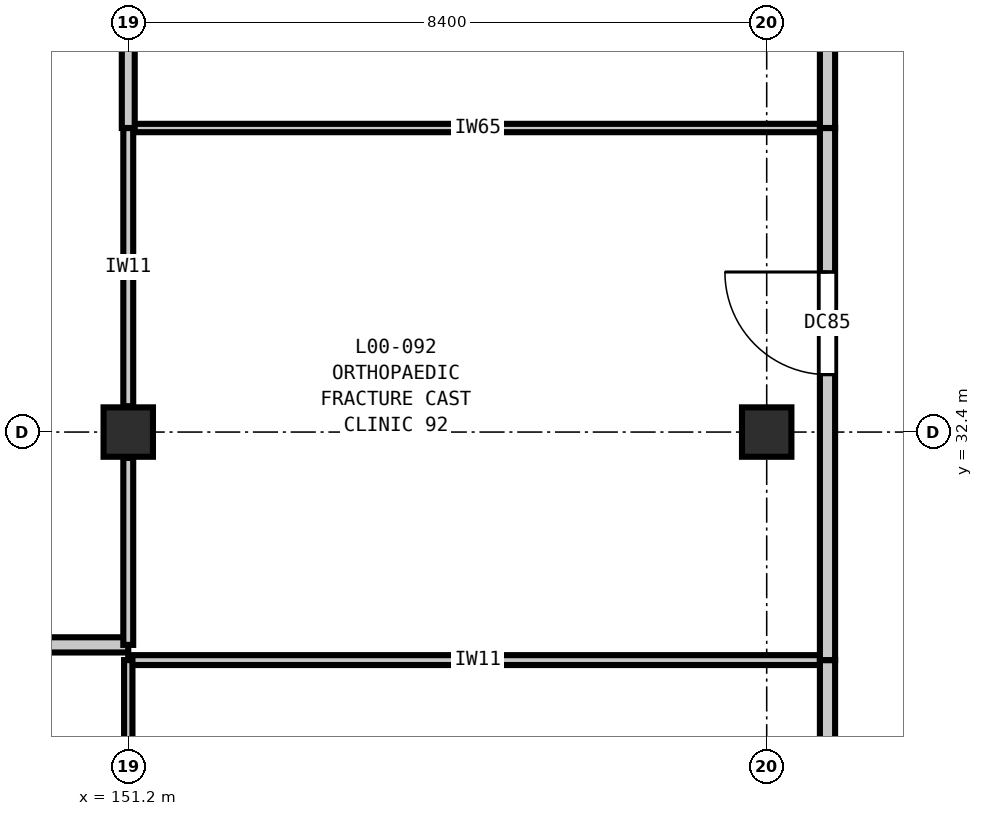
"""IFC4 building model, lengths in metres.
Left out: names, types, materials, properties, quantities, classifications, styles, units other than length and angle.
Written with IfcOpenShell. Run it as: python <this file> out.ifc"""

import sys

from ifc_helpers import new_model, si_unit, direction, frame, frame_2d, origin, origin_2d, place, context, subcontext, project, spatial, rectangle, extrude, element, fill, save


model = new_model("IFC4")
c1 = context("Model", 3, precision=1e-05, world=origin(), true_north=direction((0.0, 1.0)))
c2 = subcontext(c1, "Body", "Model", "MODEL_VIEW")
j1 = project(units=[si_unit("LENGTHUNIT", "METRE"), si_unit("PLANEANGLEUNIT", "RADIAN")], contexts=[c1])
p1 = place(None, origin())
s1 = spatial("IfcSite", under=j1, at=p1, CompositionType="ELEMENT")
p2 = place(p1, origin())
s2 = spatial("IfcBuilding", under=s1, at=p2, CompositionType="ELEMENT")
p3 = place(p2, origin())
s3 = spatial("IfcBuildingStorey", under=s2, at=p3, CompositionType="ELEMENT", Elevation=0.0)
for number, where, z_axis, x_axis in (
    (1, (151.2, 32.4, 0.0), (0.0, 0.0, 1.0), (1.0, 0.0, 0.0)),
    (2, (159.6, 32.4, 0.0), (0.0, 0.0, 1.0), (1.0, 0.0, 0.0)),
):
    element("IfcColumn", number, at=place(p3, frame(where, z_axis=z_axis, x_axis=x_axis)), inside=s3, PredefinedType="COLUMN", context=c2, shape_type="SweptSolid", body=[
        extrude(rectangle(XDim=0.65, YDim=0.65, at=origin_2d()), origin(), (0.0, 0.0, 1.0), 5.4),
    ])
p4 = place(p3, frame((151.2, 29.4, 0.0), z_axis=(0.0, 0.0, 1.0), x_axis=(1.0, 0.0, 0.0)))
e3 = element("IfcWall", 3, at=p4, inside=s3, PredefinedType="PARTITIONING", context=c2, shape_type="SweptSolid", body=[
    extrude(rectangle(XDim=9.2, YDim=0.13, at=frame_2d((4.6, 0.0))), origin(), (0.0, 0.0, 1.0), 5.04),
])
p5 = place(p3, frame((141.4, 29.6, 0.0), z_axis=(0.0, 0.0, 1.0), x_axis=(1.0, 0.0, 0.0)))
e4 = element("IfcWall", 4, at=p5, inside=s3, PredefinedType="PARTITIONING", context=c2, shape_type="SweptSolid", body=[
    extrude(rectangle(XDim=9.8, YDim=0.2, at=frame_2d((4.9, 0.0))), origin(), (0.0, 0.0, 1.0), 5.04),
])
p6 = place(p5, frame((4.125, 0.0, 0.0)))
e5 = element("IfcOpeningElement", 5, at=p6, cuts=e4, PredefinedType="OPENING", context=c2, shape_type="SweptSolid", body=[
    extrude(rectangle(XDim=1.55, YDim=2.25, at=frame_2d((0.775, 1.125))), frame((0.0, 0.11, 0.0), z_axis=(0.0, -1.0, 0.0), x_axis=(1.0, 0.0, 0.0)), (0.0, 0.0, 1.0), 0.22),
])
p7 = place(p3, frame((151.2, 36.4, 0.0), z_axis=(0.0, 0.0, 1.0), x_axis=(1.0, 0.0, 0.0)))
e6 = element("IfcWall", 6, at=p7, inside=s3, PredefinedType="PARTITIONING", context=c2, shape_type="SweptSolid", body=[
    extrude(rectangle(XDim=9.2, YDim=0.11, at=frame_2d((4.6, 0.0))), origin(), (0.0, 0.0, 1.0), 5.04),
])
p8 = place(p3, frame((151.2, 26.8, 0.0), z_axis=(0.0, 0.0, 1.0), x_axis=(0.0, 1.0, 0.0)))
e7 = element("IfcWall", 7, at=p8, inside=s3, PredefinedType="PARTITIONING", context=c2, shape_type="SweptSolid", body=[
    extrude(rectangle(XDim=2.6, YDim=0.11, at=frame_2d((1.3, 0.0))), origin(), (0.0, 0.0, 1.0), 4.685),
])
p9 = place(p3, frame((151.2, 32.74, 0.0), z_axis=(0.0, 0.0, 1.0), x_axis=(0.0, 1.0, 0.0)))
e8 = element("IfcWall", 8, at=p9, inside=s3, PredefinedType="PARTITIONING", context=c2, shape_type="SweptSolid", body=[
    extrude(rectangle(XDim=3.66, YDim=0.13, at=frame_2d((1.83, 0.0))), origin(), (0.0, 0.0, 1.0), 4.685),
])
p10 = place(p3, frame((151.2, 29.6, 0.0), z_axis=(0.0, 0.0, 1.0), x_axis=(0.0, 1.0, 0.0)))
e9 = element("IfcWall", 9, at=p10, inside=s3, PredefinedType="PARTITIONING", context=c2, shape_type="SweptSolid", body=[
    extrude(rectangle(XDim=2.46, YDim=0.13, at=frame_2d((1.23, 0.0))), origin(), (0.0, 0.0, 1.0), 4.685),
])
p11 = place(p3, frame((151.2, 36.4, 0.0), z_axis=(0.0, 0.0, 1.0), x_axis=(0.0, 1.0, 0.0)))
e10 = element("IfcWall", 10, at=p11, inside=s3, PredefinedType="PARTITIONING", context=c2, shape_type="SweptSolid", body=[
    extrude(rectangle(XDim=4.06, YDim=0.17, at=frame_2d((2.03, 0.0))), origin(), (0.0, 0.0, 1.0), 4.685),
])
p12 = place(p3, frame((160.4, 23.8, 0.0), z_axis=(0.0, 0.0, 1.0), x_axis=(0.0, 1.0, 0.0)))
e11 = element("IfcWall", 11, at=p12, inside=s3, PredefinedType="PARTITIONING", context=c2, shape_type="SweptSolid", body=[
    extrude(rectangle(XDim=5.6, YDim=0.2, at=frame_2d((2.8, 0.0))), origin(), (0.0, 0.0, 1.0), 5.04),
])
p13 = place(p12, frame((2.15, 0.0, 0.0)))
e12 = element("IfcOpeningElement", 12, at=p13, cuts=e11, PredefinedType="OPENING", context=c2, shape_type="SweptSolid", body=[
    extrude(rectangle(XDim=1.3, YDim=2.2, at=frame_2d((0.65, 1.1))), frame((0.0, 0.11, 0.0), z_axis=(0.0, -1.0, 0.0), x_axis=(1.0, 0.0, 0.0)), (0.0, 0.0, 1.0), 0.22),
])
p14 = place(p3, frame((160.4, 29.4, 0.0), z_axis=(0.0, 0.0, 1.0), x_axis=(0.0, 1.0, 0.0)))
e13 = element("IfcWall", 13, at=p14, inside=s3, PredefinedType="PARTITIONING", context=c2, shape_type="SweptSolid", body=[
    extrude(rectangle(XDim=7.0, YDim=0.2, at=frame_2d((3.5, 0.0))), origin(), (0.0, 0.0, 1.0), 5.04),
])
p15 = place(p14, frame((3.756, 0.0, 0.0)))
e14 = element("IfcOpeningElement", 14, at=p15, cuts=e13, PredefinedType="OPENING", context=c2, shape_type="SweptSolid", body=[
    extrude(rectangle(XDim=1.35, YDim=2.2, at=frame_2d((0.675, 1.1))), frame((0.0, 0.11, 0.0), z_axis=(0.0, -1.0, 0.0), x_axis=(1.0, 0.0, 0.0)), (0.0, 0.0, 1.0), 0.22),
])
p16 = place(p3, frame((160.4, 36.4, 0.0), z_axis=(0.0, 0.0, 1.0), x_axis=(0.0, 1.0, 0.0)))
e15 = element("IfcWall", 15, at=p16, inside=s3, PredefinedType="PARTITIONING", context=c2, shape_type="SweptSolid", body=[
    extrude(rectangle(XDim=11.2, YDim=0.2, at=frame_2d((5.6, 0.0))), origin(), (0.0, 0.0, 1.0), 5.04),
])
p17 = place(p16, frame((6.544, 0.0, 0.0)))
e16 = element("IfcOpeningElement", 16, at=p17, cuts=e15, PredefinedType="OPENING", context=c2, shape_type="SweptSolid", body=[
    extrude(rectangle(XDim=1.45, YDim=2.25, at=frame_2d((0.725, 1.125))), frame((0.0, 0.11, 0.0), z_axis=(0.0, -1.0, 0.0), x_axis=(1.0, 0.0, 0.0)), (0.0, 0.0, 1.0), 0.22),
])
p18 = place(p15, origin())
e17 = element("IfcDoor", 17, at=p18, inside=s3, OperationType="SINGLE_SWING_RIGHT", PredefinedType="DOOR", context=c2, shape_type="SweptSolid", body=[
    extrude(rectangle(XDim=1.35, YDim=2.2, at=frame_2d((0.675, 1.1))), frame((0.0, 0.025, 0.0), z_axis=(0.0, -1.0, 0.0), x_axis=(1.0, 0.0, 0.0)), (0.0, 0.0, 1.0), 0.05),
])
fill(e14, e17)
save(model, sys.argv[1])
